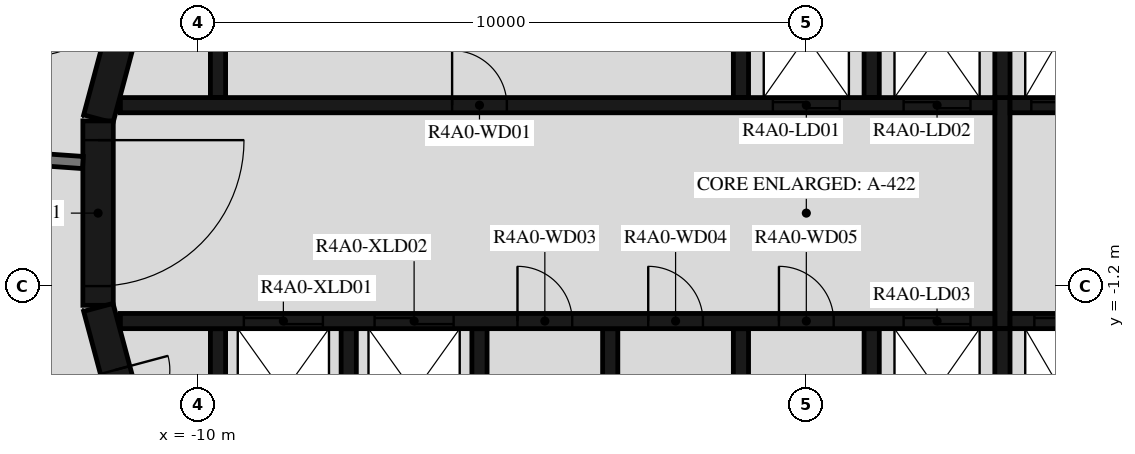
"""IFC4 building model, lengths in metres.
Left out: names, types, materials, properties, quantities, classifications, styles, units other than length and angle.
Written with IfcOpenShell. Run it as: python <this file> out.ifc"""

import sys

from ifc_helpers import new_model, si_unit, direction, frame, frame_2d, origin, place, context, subcontext, project, spatial, polyline, rectangle, outline, extrude, element, fill, save


model = new_model("IFC4")
c1 = context("Model", 3, precision=1e-05, world=origin(), true_north=direction((0.0, 1.0)))
c2 = subcontext(c1, "Body", "Model", "MODEL_VIEW")
j1 = project(units=[si_unit("LENGTHUNIT", "METRE"), si_unit("PLANEANGLEUNIT", "RADIAN")], contexts=[c1])
p1 = place(None, origin())
s1 = spatial("IfcSite", under=j1, at=p1, CompositionType="ELEMENT")
p2 = place(p1, origin())
s2 = spatial("IfcBuilding", under=s1, at=p2, CompositionType="ELEMENT")
p3 = place(p2, frame((0.0, 0.0, 151.7)))
s3 = spatial("IfcBuildingStorey", under=s2, at=p3, CompositionType="ELEMENT", Elevation=151.7)
p4 = place(p3, frame((-10.858, 4.479, 0.0), z_axis=(0.0, 0.0, 1.0), x_axis=(-0.258734743916, -0.965948410781, 0.0)))
e1 = element("IfcWall", 1, at=p4, inside=s3, PredefinedType="SHEAR", context=c2, shape_type="SweptSolid", body=[
    extrude(rectangle(XDim=3.033, YDim=0.5, at=frame_2d((1.516, 0.0))), origin(), (0.0, 0.0, 1.0), 3.12),
])
p5 = place(p3, frame((-11.647, 1.516, 0.0), z_axis=(0.0, 0.0, 1.0), x_axis=(0.0, -1.0, 0.0)))
e2 = element("IfcWall", 2, at=p5, inside=s3, PredefinedType="SHEAR", context=c2, shape_type="SweptSolid", body=[
    extrude(rectangle(XDim=3.033, YDim=0.5, at=frame_2d((1.516, 0.0))), origin(), (0.0, 0.0, 1.0), 3.12),
])
p6 = place(p5, frame((0.316, 0.0, 0.0)))
e3 = element("IfcOpeningElement", 3, at=p6, cuts=e2, PredefinedType="OPENING", context=c2, shape_type="SweptSolid", body=[
    extrude(rectangle(XDim=2.4, YDim=2.1, at=frame_2d((1.2, 1.05))), frame((0.0, 0.26, 0.0), z_axis=(0.0, -1.0, 0.0), x_axis=(1.0, 0.0, 0.0)), (0.0, 0.0, 1.0), 0.52),
])
p7 = place(p3, frame((-11.643, -1.55, 0.0), z_axis=(0.0, 0.0, 1.0), x_axis=(0.258734743916, -0.965948410781, 0.0)))
e4 = element("IfcWall", 4, at=p7, inside=s3, PredefinedType="SHEAR", context=c2, shape_type="SweptSolid", body=[
    extrude(rectangle(XDim=3.033, YDim=0.5, at=frame_2d((1.516, 0.0))), origin(), (0.0, 0.0, 1.0), 3.12),
])
p8 = place(p7, frame((1.066, 0.0, 0.0)))
e5 = element("IfcOpeningElement", 5, at=p8, cuts=e4, PredefinedType="OPENING", context=c2, shape_type="SweptSolid", body=[
    extrude(rectangle(XDim=0.9, YDim=2.1, at=frame_2d((0.45, 1.05))), frame((0.0, 0.26, 0.0), z_axis=(0.0, -1.0, 0.0), x_axis=(1.0, 0.0, 0.0)), (0.0, 0.0, 1.0), 0.52),
])
p9 = place(p3, origin())
e6 = element("IfcWall", 6, at=p9, inside=s3, PredefinedType="SHEAR", context=c2, shape_type="SweptSolid", body=[
    extrude(outline(polyline([(-9.55, 4.8), (-1.2, 4.8), (-1.2, 1.9), (-0.95, 1.9), (-0.95, 4.8), (0.95, 4.8), (0.95, 1.9), (1.2, 1.9), (1.2, 4.8), (3.1, 4.8), (3.1, 1.9), (3.35, 1.9), (3.35, 4.8), (5.25, 4.8), (5.25, 1.9), (5.5, 1.9), (5.5, 4.8), (7.4, 4.8), (7.4, 1.9), (7.65, 1.9), (7.65, 4.8), (9.55, 4.8), (9.55, 1.9), (9.8, 1.9), (9.8, 4.8), (9.8, 5.05), (-9.8, 5.05), (-9.8, 4.8), (-9.8, 1.9), (-9.55, 1.9), (-9.55, 4.8)])), origin(), (0.0, 0.0, 1.0), 3.12),
])
p10 = place(p3, origin())
e7 = element("IfcWall", 7, at=p10, inside=s3, PredefinedType="SHEAR", context=c2, shape_type="SweptSolid", body=[
    extrude(outline(polyline([(9.8, -5.05), (9.8, -4.8), (9.8, -1.9), (9.55, -1.9), (9.55, -4.8), (7.65, -4.8), (7.65, -1.9), (7.4, -1.9), (7.4, -4.8), (5.5, -4.8), (5.5, -1.9), (5.25, -1.9), (5.25, -4.8), (3.35, -4.8), (3.35, -1.9), (3.1, -1.9), (3.1, -4.8), (1.2, -4.8), (1.2, -1.9), (0.95, -1.9), (0.95, -4.8), (-0.95, -4.8), (-0.95, -1.9), (-1.2, -1.9), (-1.2, -4.8), (-3.1, -4.8), (-3.1, -1.9), (-3.35, -1.9), (-3.35, -4.8), (-5.25, -4.8), (-5.25, -1.9), (-5.5, -1.9), (-5.5, -4.8), (-7.4, -4.8), (-7.4, -1.9), (-7.65, -1.9), (-7.65, -4.8), (-9.55, -4.8), (-9.55, -1.9), (-9.8, -1.9), (-9.8, -4.8), (-9.8, -5.05), (9.8, -5.05)])), origin(), (0.0, 0.0, 1.0), 3.12),
])
p11 = place(p3, frame((-11.28, 1.775, 0.0), z_axis=(0.0, 0.0, 1.0), x_axis=(1.0, 0.0, 0.0)))
e8 = element("IfcWall", 8, at=p11, inside=s3, PredefinedType="SHEAR", context=c2, shape_type="SweptSolid", body=[
    extrude(rectangle(XDim=14.38, YDim=0.25, at=frame_2d((7.19, 0.0))), origin(), (0.0, 0.0, 1.0), 3.12),
])
p12 = place(p11, frame((10.73, 0.0, 0.0)))
e9 = element("IfcOpeningElement", 9, at=p12, cuts=e8, PredefinedType="OPENING", context=c2, shape_type="SweptSolid", body=[
    extrude(rectangle(XDim=1.1, YDim=2.1, at=frame_2d((0.55, 1.05))), frame((0.0, 0.135, 0.0), z_axis=(0.0, -1.0, 0.0), x_axis=(1.0, 0.0, 0.0)), (0.0, 0.0, 1.0), 0.27),
])
p13 = place(p11, frame((12.88, 0.0, 0.0)))
e10 = element("IfcOpeningElement", 10, at=p13, cuts=e8, PredefinedType="OPENING", context=c2, shape_type="SweptSolid", body=[
    extrude(rectangle(XDim=1.1, YDim=2.1, at=frame_2d((0.55, 1.05))), frame((0.0, 0.135, 0.0), z_axis=(0.0, -1.0, 0.0), x_axis=(1.0, 0.0, 0.0)), (0.0, 0.0, 1.0), 0.27),
])
p14 = place(p11, frame((5.455, 0.0, 0.0)))
e11 = element("IfcOpeningElement", 11, at=p14, cuts=e8, PredefinedType="OPENING", context=c2, shape_type="SweptSolid", body=[
    extrude(rectangle(XDim=0.9, YDim=2.1, at=frame_2d((0.45, 1.05))), frame((0.0, 0.135, 0.0), z_axis=(0.0, -1.0, 0.0), x_axis=(1.0, 0.0, 0.0)), (0.0, 0.0, 1.0), 0.27),
])
p15 = place(p3, frame((3.35, 1.775, 0.0), z_axis=(0.0, 0.0, 1.0), x_axis=(1.0, 0.0, 0.0)))
e12 = element("IfcWall", 12, at=p15, inside=s3, PredefinedType="SHEAR", context=c2, shape_type="SweptSolid", body=[
    extrude(rectangle(XDim=7.93, YDim=0.25, at=frame_2d((3.965, 0.0))), origin(), (0.0, 0.0, 1.0), 3.12),
])
p16 = place(p15, frame((0.35, 0.0, 0.0)))
e13 = element("IfcOpeningElement", 13, at=p16, cuts=e12, PredefinedType="OPENING", context=c2, shape_type="SweptSolid", body=[
    extrude(rectangle(XDim=1.2, YDim=2.4, at=frame_2d((0.6, 1.2))), frame((0.0, 0.135, 0.0), z_axis=(0.0, -1.0, 0.0), x_axis=(1.0, 0.0, 0.0)), (0.0, 0.0, 1.0), 0.27),
])
p17 = place(p15, frame((2.5, 0.0, 0.0)))
e14 = element("IfcOpeningElement", 14, at=p17, cuts=e12, PredefinedType="OPENING", context=c2, shape_type="SweptSolid", body=[
    extrude(rectangle(XDim=1.2, YDim=2.4, at=frame_2d((0.6, 1.2))), frame((0.0, 0.135, 0.0), z_axis=(0.0, -1.0, 0.0), x_axis=(1.0, 0.0, 0.0)), (0.0, 0.0, 1.0), 0.27),
])
p18 = place(p15, frame((4.8, 0.0, 0.0)))
e15 = element("IfcOpeningElement", 15, at=p18, cuts=e12, PredefinedType="OPENING", context=c2, shape_type="SweptSolid", body=[
    extrude(rectangle(XDim=0.9, YDim=2.1, at=frame_2d((0.45, 1.05))), frame((0.0, 0.135, 0.0), z_axis=(0.0, -1.0, 0.0), x_axis=(1.0, 0.0, 0.0)), (0.0, 0.0, 1.0), 0.27),
])
p19 = place(p3, frame((-11.28, -1.775, 0.0), z_axis=(0.0, 0.0, 1.0), x_axis=(1.0, 0.0, 0.0)))
e16 = element("IfcWall", 16, at=p19, inside=s3, PredefinedType="SHEAR", context=c2, shape_type="SweptSolid", body=[
    extrude(rectangle(XDim=14.38, YDim=0.25, at=frame_2d((7.19, 0.0))), origin(), (0.0, 0.0, 1.0), 3.12),
])
p20 = place(p19, frame((2.03, 0.0, 0.0)))
e17 = element("IfcOpeningElement", 17, at=p20, cuts=e16, PredefinedType="OPENING", context=c2, shape_type="SweptSolid", body=[
    extrude(rectangle(XDim=1.3, YDim=2.1, at=frame_2d((0.65, 1.05))), frame((0.0, 0.135, 0.0), z_axis=(0.0, -1.0, 0.0), x_axis=(1.0, 0.0, 0.0)), (0.0, 0.0, 1.0), 0.27),
])
p21 = place(p19, frame((4.18, 0.0, 0.0)))
e18 = element("IfcOpeningElement", 18, at=p21, cuts=e16, PredefinedType="OPENING", context=c2, shape_type="SweptSolid", body=[
    extrude(rectangle(XDim=1.3, YDim=2.1, at=frame_2d((0.65, 1.05))), frame((0.0, 0.135, 0.0), z_axis=(0.0, -1.0, 0.0), x_axis=(1.0, 0.0, 0.0)), (0.0, 0.0, 1.0), 0.27),
])
p22 = place(p19, frame((12.88, 0.0, 0.0)))
e19 = element("IfcOpeningElement", 19, at=p22, cuts=e16, PredefinedType="OPENING", context=c2, shape_type="SweptSolid", body=[
    extrude(rectangle(XDim=1.1, YDim=2.1, at=frame_2d((0.55, 1.05))), frame((0.0, 0.135, 0.0), z_axis=(0.0, -1.0, 0.0), x_axis=(1.0, 0.0, 0.0)), (0.0, 0.0, 1.0), 0.27),
])
p23 = place(p19, frame((6.53, 0.0, 0.0)))
e20 = element("IfcOpeningElement", 20, at=p23, cuts=e16, PredefinedType="OPENING", context=c2, shape_type="SweptSolid", body=[
    extrude(rectangle(XDim=0.9, YDim=2.1, at=frame_2d((0.45, 1.05))), frame((0.0, 0.135, 0.0), z_axis=(0.0, -1.0, 0.0), x_axis=(1.0, 0.0, 0.0)), (0.0, 0.0, 1.0), 0.27),
])
p24 = place(p19, frame((8.68, 0.0, 0.0)))
e21 = element("IfcOpeningElement", 21, at=p24, cuts=e16, PredefinedType="OPENING", context=c2, shape_type="SweptSolid", body=[
    extrude(rectangle(XDim=0.9, YDim=2.1, at=frame_2d((0.45, 1.05))), frame((0.0, 0.135, 0.0), z_axis=(0.0, -1.0, 0.0), x_axis=(1.0, 0.0, 0.0)), (0.0, 0.0, 1.0), 0.27),
])
p25 = place(p19, frame((10.83, 0.0, 0.0)))
e22 = element("IfcOpeningElement", 22, at=p25, cuts=e16, PredefinedType="OPENING", context=c2, shape_type="SweptSolid", body=[
    extrude(rectangle(XDim=0.9, YDim=2.1, at=frame_2d((0.45, 1.05))), frame((0.0, 0.135, 0.0), z_axis=(0.0, -1.0, 0.0), x_axis=(1.0, 0.0, 0.0)), (0.0, 0.0, 1.0), 0.27),
])
p26 = place(p3, frame((3.35, -1.775, 0.0), z_axis=(0.0, 0.0, 1.0), x_axis=(1.0, 0.0, 0.0)))
e23 = element("IfcWall", 23, at=p26, inside=s3, PredefinedType="SHEAR", context=c2, shape_type="SweptSolid", body=[
    extrude(rectangle(XDim=7.93, YDim=0.25, at=frame_2d((3.965, 0.0))), origin(), (0.0, 0.0, 1.0), 3.12),
])
p27 = place(p26, frame((0.4, 0.0, 0.0)))
e24 = element("IfcOpeningElement", 24, at=p27, cuts=e23, PredefinedType="OPENING", context=c2, shape_type="SweptSolid", body=[
    extrude(rectangle(XDim=1.1, YDim=2.4, at=frame_2d((0.55, 1.2))), frame((0.0, 0.135, 0.0), z_axis=(0.0, -1.0, 0.0), x_axis=(1.0, 0.0, 0.0)), (0.0, 0.0, 1.0), 0.27),
])
p28 = place(p26, frame((2.55, 0.0, 0.0)))
e25 = element("IfcOpeningElement", 25, at=p28, cuts=e23, PredefinedType="OPENING", context=c2, shape_type="SweptSolid", body=[
    extrude(rectangle(XDim=1.1, YDim=2.4, at=frame_2d((0.55, 1.2))), frame((0.0, 0.135, 0.0), z_axis=(0.0, -1.0, 0.0), x_axis=(1.0, 0.0, 0.0)), (0.0, 0.0, 1.0), 0.27),
])
p29 = place(p26, frame((4.7, 0.0, 0.0)))
e26 = element("IfcOpeningElement", 26, at=p29, cuts=e23, PredefinedType="OPENING", context=c2, shape_type="SweptSolid", body=[
    extrude(rectangle(XDim=1.1, YDim=2.4, at=frame_2d((0.55, 1.2))), frame((0.0, 0.135, 0.0), z_axis=(0.0, -1.0, 0.0), x_axis=(1.0, 0.0, 0.0)), (0.0, 0.0, 1.0), 0.27),
])
p30 = place(p3, frame((3.225, -1.9, 0.0), z_axis=(0.0, 0.0, 1.0), x_axis=(0.0, 1.0, 0.0)))
e27 = element("IfcWall", 27, at=p30, inside=s3, PredefinedType="SHEAR", context=c2, shape_type="SweptSolid", body=[
    extrude(rectangle(XDim=3.8, YDim=0.25, at=frame_2d((1.9, 0.0))), origin(), (0.0, 0.0, 1.0), 3.12),
])
p31 = place(p3, frame((-13.454, 0.941, 0.0), z_axis=(0.0, 0.0, 1.0), x_axis=(0.99755155062, -0.069934997354, 0.0)))
e28 = element("IfcWall", 28, at=p31, inside=s3, PredefinedType="STANDARD", context=c2, shape_type="SweptSolid", body=[
    extrude(rectangle(XDim=1.561, YDim=0.2, at=frame_2d((0.78, 0.0))), origin(), (0.0, 0.0, 1.0), 3.12),
])
p32 = place(p6, origin())
e29 = element("IfcDoor", 29, at=p32, inside=s3, OperationType="DOUBLE_DOOR_SINGLE_SWING", PredefinedType="DOOR", context=c2, shape_type="SweptSolid", body=[
    extrude(rectangle(XDim=2.4, YDim=2.1, at=frame_2d((1.2, 1.05))), frame((0.0, 0.025, 0.0), z_axis=(0.0, -1.0, 0.0), x_axis=(1.0, 0.0, 0.0)), (0.0, 0.0, 1.0), 0.05),
])
fill(e3, e29)
p33 = place(p12, origin())
e30 = element("IfcDoor", 30, at=p33, inside=s3, OperationType="DOUBLE_DOOR_SLIDING", PredefinedType="DOOR", context=c2, shape_type="SweptSolid", body=[
    extrude(rectangle(XDim=1.1, YDim=2.1, at=frame_2d((0.55, 1.05))), frame((0.0, 0.025, 0.0), z_axis=(0.0, -1.0, 0.0), x_axis=(1.0, 0.0, 0.0)), (0.0, 0.0, 1.0), 0.05),
])
fill(e9, e30)
p34 = place(p13, origin())
e31 = element("IfcDoor", 31, at=p34, inside=s3, OperationType="DOUBLE_DOOR_SLIDING", PredefinedType="DOOR", context=c2, shape_type="SweptSolid", body=[
    extrude(rectangle(XDim=1.1, YDim=2.1, at=frame_2d((0.55, 1.05))), frame((0.0, 0.025, 0.0), z_axis=(0.0, -1.0, 0.0), x_axis=(1.0, 0.0, 0.0)), (0.0, 0.0, 1.0), 0.05),
])
fill(e10, e31)
p35 = place(p16, origin())
e32 = element("IfcDoor", 32, at=p35, inside=s3, OperationType="DOUBLE_DOOR_SLIDING", PredefinedType="DOOR", context=c2, shape_type="SweptSolid", body=[
    extrude(rectangle(XDim=1.2, YDim=2.4, at=frame_2d((0.6, 1.2))), frame((0.0, 0.025, 0.0), z_axis=(0.0, -1.0, 0.0), x_axis=(1.0, 0.0, 0.0)), (0.0, 0.0, 1.0), 0.05),
])
fill(e13, e32)
p36 = place(p20, origin())
e33 = element("IfcDoor", 33, at=p36, inside=s3, OperationType="DOUBLE_DOOR_SLIDING", PredefinedType="DOOR", context=c2, shape_type="SweptSolid", body=[
    extrude(rectangle(XDim=1.3, YDim=2.1, at=frame_2d((0.65, 1.05))), frame((0.0, 0.025, 0.0), z_axis=(0.0, -1.0, 0.0), x_axis=(1.0, 0.0, 0.0)), (0.0, 0.0, 1.0), 0.05),
])
fill(e17, e33)
p37 = place(p21, origin())
e34 = element("IfcDoor", 34, at=p37, inside=s3, OperationType="DOUBLE_DOOR_SLIDING", PredefinedType="DOOR", context=c2, shape_type="SweptSolid", body=[
    extrude(rectangle(XDim=1.3, YDim=2.1, at=frame_2d((0.65, 1.05))), frame((0.0, 0.025, 0.0), z_axis=(0.0, -1.0, 0.0), x_axis=(1.0, 0.0, 0.0)), (0.0, 0.0, 1.0), 0.05),
])
fill(e18, e34)
p38 = place(p22, origin())
e35 = element("IfcDoor", 35, at=p38, inside=s3, OperationType="DOUBLE_DOOR_SLIDING", PredefinedType="DOOR", context=c2, shape_type="SweptSolid", body=[
    extrude(rectangle(XDim=1.1, YDim=2.1, at=frame_2d((0.55, 1.05))), frame((0.0, 0.025, 0.0), z_axis=(0.0, -1.0, 0.0), x_axis=(1.0, 0.0, 0.0)), (0.0, 0.0, 1.0), 0.05),
])
fill(e19, e35)
p39 = place(p27, origin())
e36 = element("IfcDoor", 36, at=p39, inside=s3, OperationType="DOUBLE_DOOR_SLIDING", PredefinedType="DOOR", context=c2, shape_type="SweptSolid", body=[
    extrude(rectangle(XDim=1.1, YDim=2.4, at=frame_2d((0.55, 1.2))), frame((0.0, 0.025, 0.0), z_axis=(0.0, -1.0, 0.0), x_axis=(1.0, 0.0, 0.0)), (0.0, 0.0, 1.0), 0.05),
])
fill(e24, e36)
p40 = place(p14, origin())
e37 = element("IfcDoor", 37, at=p40, inside=s3, OperationType="SINGLE_SWING_LEFT", PredefinedType="DOOR", context=c2, shape_type="SweptSolid", body=[
    extrude(rectangle(XDim=0.9, YDim=2.1, at=frame_2d((0.45, 1.05))), frame((0.0, 0.025, 0.0), z_axis=(0.0, -1.0, 0.0), x_axis=(1.0, 0.0, 0.0)), (0.0, 0.0, 1.0), 0.05),
])
fill(e11, e37)
p41 = place(p23, origin())
e38 = element("IfcDoor", 38, at=p41, inside=s3, OperationType="SINGLE_SWING_LEFT", PredefinedType="DOOR", context=c2, shape_type="SweptSolid", body=[
    extrude(rectangle(XDim=0.9, YDim=2.1, at=frame_2d((0.45, 1.05))), frame((0.0, 0.025, 0.0), z_axis=(0.0, -1.0, 0.0), x_axis=(1.0, 0.0, 0.0)), (0.0, 0.0, 1.0), 0.05),
])
fill(e20, e38)
p42 = place(p24, origin())
e39 = element("IfcDoor", 39, at=p42, inside=s3, OperationType="SINGLE_SWING_RIGHT", PredefinedType="DOOR", context=c2, shape_type="SweptSolid", body=[
    extrude(rectangle(XDim=0.9, YDim=2.1, at=frame_2d((0.45, 1.05))), frame((0.0, 0.025, 0.0), z_axis=(0.0, -1.0, 0.0), x_axis=(1.0, 0.0, 0.0)), (0.0, 0.0, 1.0), 0.05),
])
fill(e21, e39)
p43 = place(p25, origin())
e40 = element("IfcDoor", 40, at=p43, inside=s3, OperationType="SINGLE_SWING_LEFT", PredefinedType="DOOR", context=c2, shape_type="SweptSolid", body=[
    extrude(rectangle(XDim=0.9, YDim=2.1, at=frame_2d((0.45, 1.05))), frame((0.0, 0.025, 0.0), z_axis=(0.0, -1.0, 0.0), x_axis=(1.0, 0.0, 0.0)), (0.0, 0.0, 1.0), 0.05),
])
fill(e22, e40)
p44 = place(p8, origin())
e41 = element("IfcDoor", 41, at=p44, inside=s3, OperationType="SINGLE_SWING_RIGHT", PredefinedType="DOOR", context=c2, shape_type="SweptSolid", body=[
    extrude(rectangle(XDim=0.9, YDim=2.1, at=frame_2d((0.45, 1.05))), frame((0.0, 0.025, 0.0), z_axis=(0.0, -1.0, 0.0), x_axis=(1.0, 0.0, 0.0)), (0.0, 0.0, 1.0), 0.05),
])
fill(e5, e41)
save(model, sys.argv[1])
